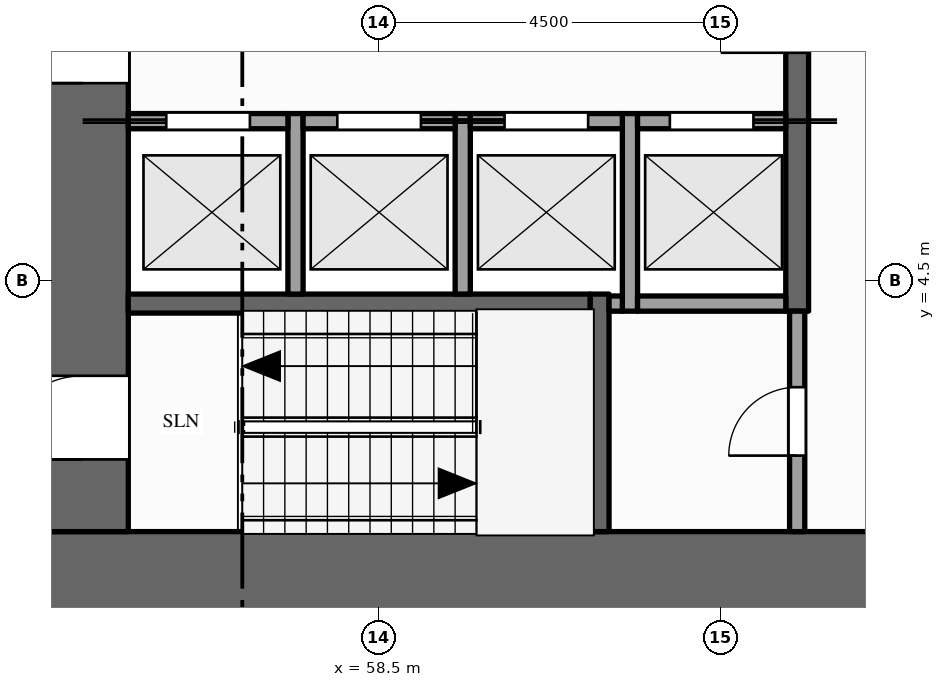
"""IFC4 building model, lengths in metres.
Left out: names, types, materials, properties, quantities, classifications, styles, units other than length and angle.
Written with IfcOpenShell. Run it as: python <this file> out.ifc"""

import sys

from ifc_helpers import new_model, si_unit, direction, frame, frame_2d, origin, place, context, subcontext, project, spatial, rectangle, extrude, element, fill, save


model = new_model("IFC4")
c1 = context("Model", 3, precision=1e-05, world=origin(), true_north=direction((0.0, 1.0)))
c2 = subcontext(c1, "Body", "Model", "MODEL_VIEW")
j1 = project(units=[si_unit("LENGTHUNIT", "METRE"), si_unit("PLANEANGLEUNIT", "RADIAN")], contexts=[c1])
p1 = place(None, origin())
s1 = spatial("IfcSite", under=j1, at=p1, CompositionType="ELEMENT")
p2 = place(p1, origin())
s2 = spatial("IfcBuilding", under=s1, at=p2, CompositionType="ELEMENT")
p3 = place(p2, frame((0.0, 0.0, 115.0)))
s3 = spatial("IfcBuildingStorey", under=s2, at=p3, CompositionType="ELEMENT", Elevation=115.0)
p4 = place(p3, frame((67.5, 0.6, -0.15), z_axis=(0.0, 0.0, 1.0), x_axis=(-1.0, 0.0, 0.0)))
e1 = element("IfcWall", 1, at=p4, inside=s3, PredefinedType="SHEAR", context=c2, shape_type="SweptSolid", body=[
    extrude(rectangle(XDim=13.5, YDim=1.2, at=frame_2d((6.75, 0.0))), origin(), (0.0, 0.0, 1.0), 4.0),
])
p5 = place(p3, frame((54.6, 1.2, -0.15), z_axis=(0.0, 0.0, 1.0), x_axis=(0.0, 1.0, 0.0)))
e2 = element("IfcWall", 2, at=p5, inside=s3, PredefinedType="SHEAR", context=c2, shape_type="SweptSolid", body=[
    extrude(rectangle(XDim=20.1, YDim=1.2, at=frame_2d((10.05, 0.0))), origin(), (0.0, 0.0, 1.0), 4.0),
])
p6 = place(p5, frame((5.9, 0.0, 0.15)))
e3 = element("IfcOpeningElement", 3, at=p6, cuts=e2, PredefinedType="OPENING", context=c2, shape_type="SweptSolid", body=[
    extrude(rectangle(XDim=1.8, YDim=2.1, at=frame_2d((0.9, 1.05))), frame((0.0, 0.61, 0.0), z_axis=(0.0, -1.0, 0.0), x_axis=(1.0, 0.0, 0.0)), (0.0, 0.0, 1.0), 1.22),
])
p7 = place(p5, frame((11.95, 0.0, 0.15)))
e4 = element("IfcOpeningElement", 4, at=p7, cuts=e2, PredefinedType="OPENING", context=c2, shape_type="SweptSolid", body=[
    extrude(rectangle(XDim=1.1, YDim=2.1, at=frame_2d((0.55, 1.05))), frame((0.0, 0.61, 0.0), z_axis=(0.0, -1.0, 0.0), x_axis=(1.0, 0.0, 0.0)), (0.0, 0.0, 1.0), 1.22),
])
p8 = place(p5, frame((0.95, 0.0, 0.15)))
e5 = element("IfcOpeningElement", 5, at=p8, cuts=e2, PredefinedType="OPENING", context=c2, shape_type="SweptSolid", body=[
    extrude(rectangle(XDim=1.1, YDim=2.1, at=frame_2d((0.55, 1.05))), frame((0.0, 0.61, 0.0), z_axis=(0.0, -1.0, 0.0), x_axis=(1.0, 0.0, 0.0)), (0.0, 0.0, 1.0), 1.22),
])
p9 = place(p5, frame((18.15, 0.0, 0.15)))
e6 = element("IfcOpeningElement", 6, at=p9, cuts=e2, PredefinedType="OPENING", context=c2, shape_type="SweptSolid", body=[
    extrude(rectangle(XDim=1.1, YDim=2.1, at=frame_2d((0.55, 1.05))), frame((0.0, 0.61, 0.0), z_axis=(0.0, -1.0, 0.0), x_axis=(1.0, 0.0, 0.0)), (0.0, 0.0, 1.0), 1.22),
])
for number, where, z_axis, x_axis in (
    (7, (57.4, 4.325, 0.0), (0.0, 0.0, 1.0), (0.0, 1.0, 0.0)),
    (8, (59.6, 4.325, 0.0), (0.0, 0.0, 1.0), (0.0, 1.0, 0.0)),
):
    element("IfcWall", number, at=place(p3, frame(where, z_axis=z_axis, x_axis=x_axis)), inside=s3, PredefinedType="SOLIDWALL", context=c2, shape_type="SweptSolid", body=[
        extrude(rectangle(XDim=2.375, YDim=0.2, at=frame_2d((1.188, 0.0))), origin(), (0.0, 0.0, 1.0), 3.85),
    ])
p10 = place(p3, frame((61.4, 1.2, 0.0), z_axis=(0.0, 0.0, 1.0), x_axis=(0.0, 1.0, 0.0)))
e9 = element("IfcWall", 9, at=p10, inside=s3, PredefinedType="SHEAR", context=c2, shape_type="SweptSolid", body=[
    extrude(rectangle(XDim=3.125, YDim=0.25, at=frame_2d((1.562, 0.0))), origin(), (0.0, 0.0, 1.0), 3.85),
])
p11 = place(p3, frame((61.8, 4.1, 0.0), z_axis=(0.0, 0.0, 1.0), x_axis=(0.0, 1.0, 0.0)))
e10 = element("IfcWall", 10, at=p11, inside=s3, PredefinedType="SOLIDWALL", context=c2, shape_type="SweptSolid", body=[
    extrude(rectangle(XDim=2.6, YDim=0.2, at=frame_2d((1.3, 0.0))), origin(), (0.0, 0.0, 1.0), 3.85),
])
p12 = place(p3, frame((64.0, 1.2, 0.0), z_axis=(0.0, 0.0, 1.0), x_axis=(0.0, 1.0, 0.0)))
e11 = element("IfcWall", 11, at=p12, inside=s3, PredefinedType="PARTITIONING", context=c2, shape_type="SweptSolid", body=[
    extrude(rectangle(XDim=2.9, YDim=0.2, at=frame_2d((1.45, 0.0))), origin(), (0.0, 0.0, 1.0), 3.85),
])
p13 = place(p12, frame((1.0, 0.0, 0.0)))
e12 = element("IfcOpeningElement", 12, at=p13, cuts=e11, PredefinedType="OPENING", context=c2, shape_type="SweptSolid", body=[
    extrude(rectangle(XDim=0.9, YDim=2.1, at=frame_2d((0.45, 1.05))), frame((0.0, 0.11, 0.0), z_axis=(0.0, -1.0, 0.0), x_axis=(1.0, 0.0, 0.0)), (0.0, 0.0, 1.0), 0.22),
])
p14 = place(p3, frame((64.0, 4.1, 0.0), z_axis=(0.0, 0.0, 1.0), x_axis=(0.0, 1.0, 0.0)))
e13 = element("IfcWall", 13, at=p14, inside=s3, PredefinedType="SHEAR", context=c2, shape_type="SweptSolid", body=[
    extrude(rectangle(XDim=14.5, YDim=0.3, at=frame_2d((7.25, 0.0))), origin(), (0.0, 0.0, 1.0), 3.85),
])
p15 = place(p14, frame((3.4, 0.0, 0.0)))
e14 = element("IfcOpeningElement", 14, at=p15, cuts=e13, PredefinedType="OPENING", context=c2, shape_type="SweptSolid", body=[
    extrude(rectangle(XDim=1.0, YDim=2.1, at=frame_2d((0.5, 1.05))), frame((0.0, 0.16, 0.0), z_axis=(0.0, -1.0, 0.0), x_axis=(1.0, 0.0, 0.0)), (0.0, 0.0, 1.0), 0.32),
])
p16 = place(p14, frame((9.1, 0.0, 0.0)))
e15 = element("IfcOpeningElement", 15, at=p16, cuts=e13, PredefinedType="OPENING", context=c2, shape_type="SweptSolid", body=[
    extrude(rectangle(XDim=1.0, YDim=2.1, at=frame_2d((0.5, 1.05))), frame((0.0, 0.16, 0.0), z_axis=(0.0, -1.0, 0.0), x_axis=(1.0, 0.0, 0.0)), (0.0, 0.0, 1.0), 0.32),
])
p17 = place(p3, frame((55.2, 4.2, 0.0), z_axis=(0.0, 0.0, 1.0), x_axis=(1.0, 0.0, 0.0)))
e16 = element("IfcWall", 16, at=p17, inside=s3, PredefinedType="SHEAR", context=c2, shape_type="SweptSolid", body=[
    extrude(rectangle(XDim=6.075, YDim=0.25, at=frame_2d((3.038, 0.0))), origin(), (0.0, 0.0, 1.0), 3.85),
])
p18 = place(p3, frame((61.525, 4.2, 0.0), z_axis=(0.0, 0.0, 1.0), x_axis=(1.0, 0.0, 0.0)))
e17 = element("IfcWall", 17, at=p18, inside=s3, PredefinedType="SOLIDWALL", context=c2, shape_type="SweptSolid", body=[
    extrude(rectangle(XDim=0.175, YDim=0.2, at=frame_2d((0.087, 0.0))), origin(), (0.0, 0.0, 1.0), 3.85),
])
p19 = place(p3, frame((61.9, 4.2, 0.0), z_axis=(0.0, 0.0, 1.0), x_axis=(1.0, 0.0, 0.0)))
e18 = element("IfcWall", 18, at=p19, inside=s3, PredefinedType="SOLIDWALL", context=c2, shape_type="SweptSolid", body=[
    extrude(rectangle(XDim=1.95, YDim=0.2, at=frame_2d((0.975, 0.0))), origin(), (0.0, 0.0, 1.0), 3.85),
])
p20 = place(p3, frame((55.2, 6.6, 0.0), z_axis=(0.0, 0.0, 1.0), x_axis=(1.0, 0.0, 0.0)))
e19 = element("IfcWall", 19, at=p20, inside=s3, PredefinedType="SOLIDWALL", context=c2, shape_type="SweptSolid", body=[
    extrude(rectangle(XDim=2.1, YDim=0.2, at=frame_2d((1.05, 0.0))), origin(), (0.0, 0.0, 1.0), 3.85),
])
p21 = place(p20, frame((0.5, 0.0, 0.012)))
e20 = element("IfcOpeningElement", 20, at=p21, cuts=e19, PredefinedType="OPENING", context=c2, shape_type="SweptSolid", body=[
    extrude(rectangle(XDim=1.1, YDim=2.1, at=frame_2d((0.55, 1.05))), frame((0.0, 0.11, 0.0), z_axis=(0.0, -1.0, 0.0), x_axis=(1.0, 0.0, 0.0)), (0.0, 0.0, 1.0), 0.22),
])
p22 = place(p3, frame((57.5, 6.6, 0.0), z_axis=(0.0, 0.0, 1.0), x_axis=(1.0, 0.0, 0.0)))
e21 = element("IfcWall", 21, at=p22, inside=s3, PredefinedType="SOLIDWALL", context=c2, shape_type="SweptSolid", body=[
    extrude(rectangle(XDim=2.0, YDim=0.2, at=frame_2d((1.0, 0.0))), origin(), (0.0, 0.0, 1.0), 3.85),
])
p23 = place(p22, frame((0.45, 0.0, 0.012)))
e22 = element("IfcOpeningElement", 22, at=p23, cuts=e21, PredefinedType="OPENING", context=c2, shape_type="SweptSolid", body=[
    extrude(rectangle(XDim=1.1, YDim=2.1, at=frame_2d((0.55, 1.05))), frame((0.0, 0.11, 0.0), z_axis=(0.0, -1.0, 0.0), x_axis=(1.0, 0.0, 0.0)), (0.0, 0.0, 1.0), 0.22),
])
p24 = place(p3, frame((59.7, 6.6, 0.0), z_axis=(0.0, 0.0, 1.0), x_axis=(1.0, 0.0, 0.0)))
e23 = element("IfcWall", 23, at=p24, inside=s3, PredefinedType="SOLIDWALL", context=c2, shape_type="SweptSolid", body=[
    extrude(rectangle(XDim=2.0, YDim=0.2, at=frame_2d((1.0, 0.0))), origin(), (0.0, 0.0, 1.0), 3.85),
])
p25 = place(p24, frame((0.45, 0.0, 0.012)))
e24 = element("IfcOpeningElement", 24, at=p25, cuts=e23, PredefinedType="OPENING", context=c2, shape_type="SweptSolid", body=[
    extrude(rectangle(XDim=1.1, YDim=2.1, at=frame_2d((0.55, 1.05))), frame((0.0, 0.11, 0.0), z_axis=(0.0, -1.0, 0.0), x_axis=(1.0, 0.0, 0.0)), (0.0, 0.0, 1.0), 0.22),
])
p26 = place(p3, frame((61.9, 6.6, 0.0), z_axis=(0.0, 0.0, 1.0), x_axis=(1.0, 0.0, 0.0)))
e25 = element("IfcWall", 25, at=p26, inside=s3, PredefinedType="SOLIDWALL", context=c2, shape_type="SweptSolid", body=[
    extrude(rectangle(XDim=1.95, YDim=0.2, at=frame_2d((0.975, 0.0))), origin(), (0.0, 0.0, 1.0), 3.85),
])
p27 = place(p26, frame((0.425, 0.0, 0.012)))
e26 = element("IfcOpeningElement", 26, at=p27, cuts=e25, PredefinedType="OPENING", context=c2, shape_type="SweptSolid", body=[
    extrude(rectangle(XDim=1.1, YDim=2.1, at=frame_2d((0.55, 1.05))), frame((0.0, 0.11, 0.0), z_axis=(0.0, -1.0, 0.0), x_axis=(1.0, 0.0, 0.0)), (0.0, 0.0, 1.0), 0.22),
])
p28 = place(p21, origin())
e27 = element("IfcDoor", 27, at=p28, inside=s3, OperationType="SLIDING_TO_LEFT", PredefinedType="DOOR", context=c2, shape_type="SweptSolid", body=[
    extrude(rectangle(XDim=1.1, YDim=2.1, at=frame_2d((0.55, 1.05))), frame((0.0, 0.025, 0.0), z_axis=(0.0, -1.0, 0.0), x_axis=(1.0, 0.0, 0.0)), (0.0, 0.0, 1.0), 0.05),
])
fill(e20, e27)
p29 = place(p23, origin())
e28 = element("IfcDoor", 28, at=p29, inside=s3, OperationType="SLIDING_TO_RIGHT", PredefinedType="DOOR", context=c2, shape_type="SweptSolid", body=[
    extrude(rectangle(XDim=1.1, YDim=2.1, at=frame_2d((0.55, 1.05))), frame((0.0, 0.025, 0.0), z_axis=(0.0, -1.0, 0.0), x_axis=(1.0, 0.0, 0.0)), (0.0, 0.0, 1.0), 0.05),
])
fill(e22, e28)
p30 = place(p25, origin())
e29 = element("IfcDoor", 29, at=p30, inside=s3, OperationType="SLIDING_TO_LEFT", PredefinedType="DOOR", context=c2, shape_type="SweptSolid", body=[
    extrude(rectangle(XDim=1.1, YDim=2.1, at=frame_2d((0.55, 1.05))), frame((0.0, 0.025, 0.0), z_axis=(0.0, -1.0, 0.0), x_axis=(1.0, 0.0, 0.0)), (0.0, 0.0, 1.0), 0.05),
])
fill(e24, e29)
p31 = place(p27, origin())
e30 = element("IfcDoor", 30, at=p31, inside=s3, OperationType="SLIDING_TO_RIGHT", PredefinedType="DOOR", context=c2, shape_type="SweptSolid", body=[
    extrude(rectangle(XDim=1.1, YDim=2.1, at=frame_2d((0.55, 1.05))), frame((0.0, 0.025, 0.0), z_axis=(0.0, -1.0, 0.0), x_axis=(1.0, 0.0, 0.0)), (0.0, 0.0, 1.0), 0.05),
])
fill(e26, e30)
p32 = place(p6, origin())
e31 = element("IfcDoor", 31, at=p32, inside=s3, OperationType="DOUBLE_DOOR_SINGLE_SWING", PredefinedType="DOOR", context=c2, shape_type="SweptSolid", body=[
    extrude(rectangle(XDim=1.8, YDim=2.1, at=frame_2d((0.9, 1.05))), frame((0.0, 0.025, 0.0), z_axis=(0.0, -1.0, 0.0), x_axis=(1.0, 0.0, 0.0)), (0.0, 0.0, 1.0), 0.05),
])
fill(e3, e31)
p33 = place(p8, origin())
e32 = element("IfcDoor", 32, at=p33, inside=s3, OperationType="SINGLE_SWING_LEFT", PredefinedType="DOOR", context=c2, shape_type="SweptSolid", body=[
    extrude(rectangle(XDim=1.1, YDim=2.1, at=frame_2d((0.55, 1.05))), frame((0.0, 0.025, 0.0), z_axis=(0.0, -1.0, 0.0), x_axis=(1.0, 0.0, 0.0)), (0.0, 0.0, 1.0), 0.05),
])
fill(e5, e32)
p34 = place(p13, origin())
e33 = element("IfcDoor", 33, at=p34, inside=s3, OperationType="SINGLE_SWING_LEFT", PredefinedType="DOOR", context=c2, shape_type="SweptSolid", body=[
    extrude(rectangle(XDim=0.9, YDim=2.1, at=frame_2d((0.45, 1.05))), frame((0.0, 0.025, 0.0), z_axis=(0.0, -1.0, 0.0), x_axis=(1.0, 0.0, 0.0)), (0.0, 0.0, 1.0), 0.05),
])
fill(e12, e33)
save(model, sys.argv[1])
